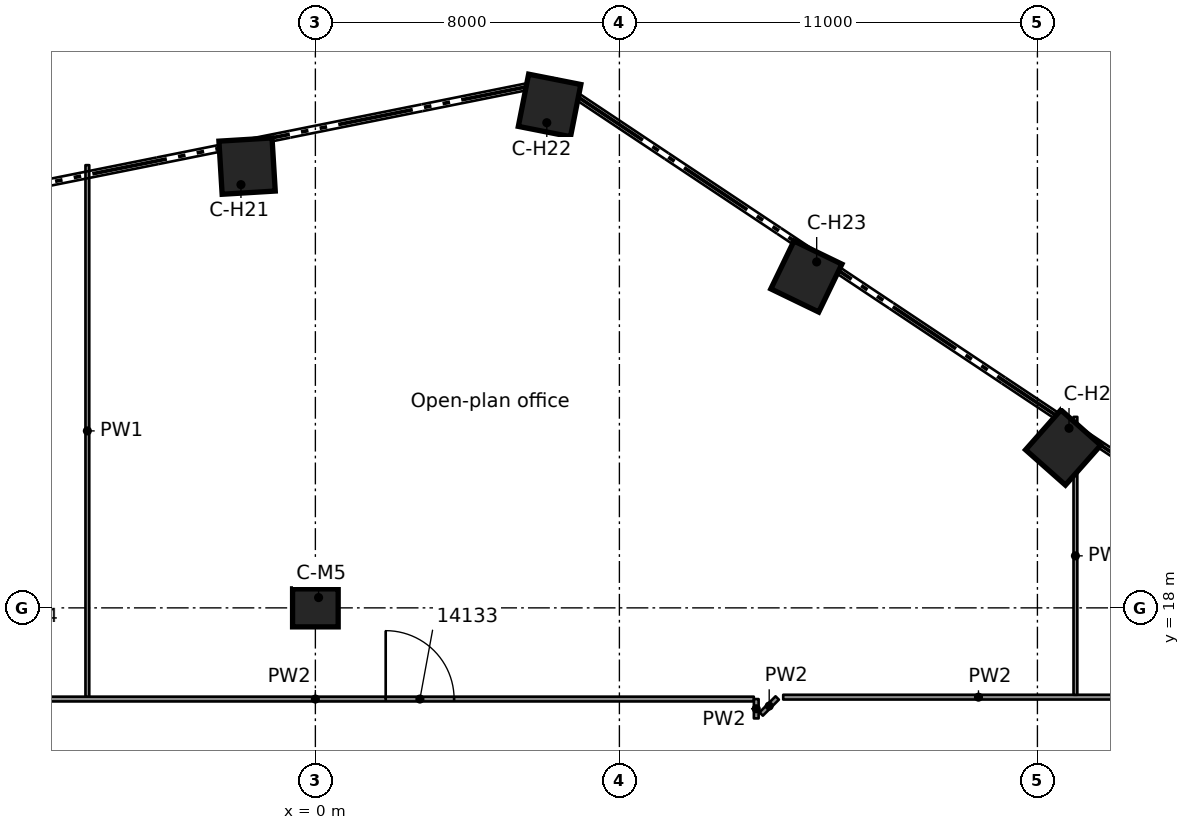
"""IFC4 building model, lengths in metres.
Left out: names, types, materials, properties, quantities, classifications, styles, units other than length and angle.
Written with IfcOpenShell. Run it as: python <this file> out.ifc"""

import sys

from ifc_helpers import new_model, si_unit, direction, frame, frame_2d, origin, origin_2d, place, context, subcontext, project, spatial, rectangle, extrude, element, fill, save


model = new_model("IFC4")
c1 = context("Model", 3, precision=1e-05, world=origin(), true_north=direction((0.0, 1.0)))
c2 = subcontext(c1, "Body", "Model", "MODEL_VIEW")
j1 = project(units=[si_unit("LENGTHUNIT", "METRE"), si_unit("PLANEANGLEUNIT", "RADIAN")], contexts=[c1])
p1 = place(None, origin())
s1 = spatial("IfcSite", under=j1, at=p1, CompositionType="ELEMENT")
p2 = place(p1, origin())
s2 = spatial("IfcBuilding", under=s1, at=p2, CompositionType="ELEMENT")
p3 = place(p2, frame((0.0, 0.0, 69.3)))
s3 = spatial("IfcBuildingStorey", under=s2, at=p3, CompositionType="ELEMENT", Elevation=69.3)
for number, where, z_axis, x_axis in (
    (1, (-1.797, 29.624, 0.0), (0.0, 0.0, 1.0), (-0.061, 0.998, 0.0)),
    (2, (6.163, 31.22, 0.0), (0.0, 0.0, 1.0), (0.194, 0.981, 0.0)),
    (3, (12.92, 26.719, 0.0), (0.0, 0.0, 1.0), (0.435, 0.9, 0.0)),
    (4, (19.677, 22.219, 0.0), (0.0, 0.0, 1.0), (0.663, 0.749, 0.0)),
):
    element("IfcColumn", number, at=place(p3, frame(where, z_axis=z_axis, x_axis=x_axis)), inside=s3, PredefinedType="COLUMN", context=c2, shape_type="SweptSolid", body=[
        extrude(rectangle(XDim=1.4, YDim=1.4, at=origin_2d()), origin(), (0.0, 0.0, 1.0), 3.5),
    ])
p4 = place(p3, frame((0.0, 18.0, 0.0), z_axis=(0.0, 0.0, 1.0), x_axis=(1.0, 0.0, 0.0)))
e5 = element("IfcColumn", 5, at=p4, inside=s3, PredefinedType="COLUMN", context=c2, shape_type="SweptSolid", body=[
    extrude(rectangle(XDim=1.2, YDim=1.0, at=origin_2d()), origin(), (0.0, 0.0, 1.0), 3.5),
])
p5 = place(p3, frame((-11.537, 15.601, 0.0), z_axis=(0.0, 0.0, 1.0), x_axis=(1.0, 0.0, 0.0)))
e6 = element("IfcWall", 6, at=p5, inside=s3, PredefinedType="PARTITIONING", context=c2, shape_type="SweptSolid", body=[
    extrude(rectangle(XDim=23.074, YDim=0.125, at=frame_2d((11.537, 0.0))), origin(), (0.0, 0.0, 1.0), 3.03),
])
p6 = place(p5, frame((13.387, 0.0, 0.0)))
e7 = element("IfcOpeningElement", 7, at=p6, cuts=e6, PredefinedType="OPENING", context=c2, shape_type="SweptSolid", body=[
    extrude(rectangle(XDim=1.8, YDim=2.1, at=frame_2d((0.9, 1.05))), frame((0.0, 0.073, 0.0), z_axis=(0.0, -1.0, 0.0), x_axis=(1.0, 0.0, 0.0)), (0.0, 0.0, 1.0), 0.145),
])
p7 = place(p5, frame((1.788, 0.0, 0.0)))
e8 = element("IfcOpeningElement", 8, at=p7, cuts=e6, PredefinedType="OPENING", context=c2, shape_type="SweptSolid", body=[
    extrude(rectangle(XDim=1.8, YDim=2.1, at=frame_2d((0.9, 1.05))), frame((0.0, 0.073, 0.0), z_axis=(0.0, -1.0, 0.0), x_axis=(1.0, 0.0, 0.0)), (0.0, 0.0, 1.0), 0.145),
])
p8 = place(p3, frame((12.311, 15.651, 0.0), z_axis=(0.0, 0.0, 1.0), x_axis=(1.0, 0.0, 0.0)))
e9 = element("IfcWall", 9, at=p8, inside=s3, PredefinedType="PARTITIONING", context=c2, shape_type="SweptSolid", body=[
    extrude(rectangle(XDim=10.276, YDim=0.125, at=frame_2d((5.138, 0.0))), origin(), (0.0, 0.0, 1.0), 3.03),
])
p9 = place(p3, frame((11.731, 15.207, 0.0), z_axis=(0.0, 0.0, 1.0), x_axis=(0.707311295066, 0.70690220814, 0.0)))
e10 = element("IfcWall", 10, at=p9, inside=s3, PredefinedType="PARTITIONING", context=c2, shape_type="SweptSolid", body=[
    extrude(rectangle(XDim=0.597, YDim=0.125, at=frame_2d((0.298, 0.0))), origin(), (0.0, 0.0, 1.0), 3.03),
])
p10 = place(p3, frame((20.0, 15.713, 0.0), z_axis=(0.0, 0.0, 1.0), x_axis=(0.0, 1.0, 0.0)))
e11 = element("IfcWall", 11, at=p10, inside=s3, PredefinedType="PARTITIONING", context=c2, shape_type="SweptSolid", body=[
    extrude(rectangle(XDim=7.312, YDim=0.1, at=frame_2d((3.656, 0.0))), origin(), (0.0, 0.0, 1.0), 2.419),
])
p11 = place(p3, frame((11.601, 15.092, 0.0), z_axis=(0.0, 0.0, 1.0), x_axis=(0.0, 1.0, 0.0)))
e12 = element("IfcWall", 12, at=p11, inside=s3, PredefinedType="PARTITIONING", context=c2, shape_type="SweptSolid", body=[
    extrude(rectangle(XDim=0.508, YDim=0.125, at=frame_2d((0.254, 0.0))), origin(), (0.0, 0.0, 1.0), 3.03),
])
p12 = place(p3, frame((-6.0, 15.664, 0.0), z_axis=(0.0, 0.0, 1.0), x_axis=(0.0, 1.0, 0.0)))
e13 = element("IfcWall", 13, at=p12, inside=s3, PredefinedType="PARTITIONING", context=c2, shape_type="SweptSolid", body=[
    extrude(rectangle(XDim=13.985, YDim=0.1, at=frame_2d((6.992, 0.0))), origin(), (0.0, 0.0, 1.0), 3.03),
])
p13 = place(p6, origin())
e14 = element("IfcDoor", 14, at=p13, inside=s3, OperationType="DOUBLE_DOOR_SINGLE_SWING", PredefinedType="DOOR", context=c2, shape_type="SweptSolid", body=[
    extrude(rectangle(XDim=1.8, YDim=2.1, at=frame_2d((0.9, 1.05))), frame((0.0, 0.025, 0.0), z_axis=(0.0, -1.0, 0.0), x_axis=(1.0, 0.0, 0.0)), (0.0, 0.0, 1.0), 0.05),
])
fill(e7, e14)
save(model, sys.argv[1])
